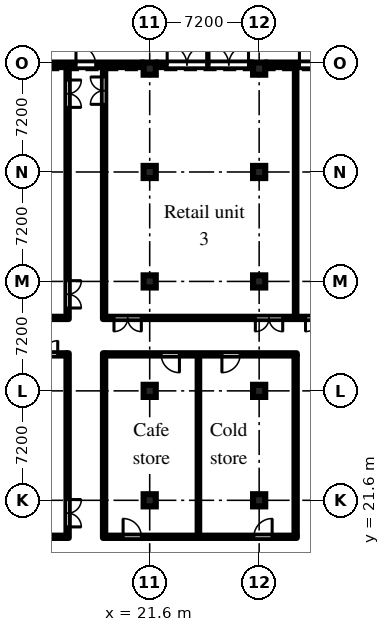
"""IFC4 building model, lengths in metres.
Left out: names, types, materials, properties, quantities, classifications, styles, units other than length and angle.
Written with IfcOpenShell. Run it as: python <this file> out.ifc"""

import sys

from ifc_helpers import new_model, si_unit, direction, frame, frame_2d, origin, origin_2d, place, context, subcontext, project, spatial, rectangle, extrude, element, fill, save


model = new_model("IFC4")
c1 = context("Model", 3, precision=1e-05, world=origin(), true_north=direction((0.0, 1.0)))
c2 = subcontext(c1, "Body", "Model", "MODEL_VIEW")
j1 = project(units=[si_unit("LENGTHUNIT", "METRE"), si_unit("PLANEANGLEUNIT", "RADIAN")], contexts=[c1])
p1 = place(None, origin())
s1 = spatial("IfcSite", under=j1, at=p1, CompositionType="ELEMENT")
p2 = place(p1, origin())
s2 = spatial("IfcBuilding", under=s1, at=p2, CompositionType="ELEMENT")
p3 = place(p2, origin())
s3 = spatial("IfcBuildingStorey", under=s2, at=p3, CompositionType="ELEMENT", Elevation=0.0)
for number, where, z_axis, x_axis in (
    (1, (21.6, 21.6, 0.0), (0.0, 0.0, 1.0), (1.0, 0.0, 0.0)),
    (2, (21.6, 28.8, 0.0), (0.0, 0.0, 1.0), (1.0, 0.0, 0.0)),
    (3, (21.6, 36.0, 0.0), (0.0, 0.0, 1.0), (1.0, 0.0, 0.0)),
    (4, (21.6, 43.2, 0.0), (0.0, 0.0, 1.0), (1.0, 0.0, 0.0)),
    (5, (21.6, 50.0, 0.0), (0.0, 0.0, 1.0), (1.0, 0.0, 0.0)),
    (6, (28.8, 21.6, 0.0), (0.0, 0.0, 1.0), (1.0, 0.0, 0.0)),
    (7, (28.8, 28.8, 0.0), (0.0, 0.0, 1.0), (1.0, 0.0, 0.0)),
    (8, (28.8, 36.0, 0.0), (0.0, 0.0, 1.0), (1.0, 0.0, 0.0)),
    (9, (28.8, 43.2, 0.0), (0.0, 0.0, 1.0), (1.0, 0.0, 0.0)),
    (10, (28.8, 50.0, 0.0), (0.0, 0.0, 1.0), (1.0, 0.0, 0.0)),
):
    element("IfcColumn", number, at=place(p3, frame(where, z_axis=z_axis, x_axis=x_axis)), inside=s3, PredefinedType="COLUMN", context=c2, shape_type="SweptSolid", body=[
        extrude(rectangle(XDim=0.8, YDim=0.8, at=origin_2d()), origin(), (0.0, 0.0, 1.0), 6.6),
    ])
p4 = place(p3, frame((35.6, 50.25, 0.0), z_axis=(0.0, 0.0, 1.0), x_axis=(-1.0, 0.0, 0.0)))
e11 = element("IfcWall", 11, at=p4, inside=s3, PredefinedType="SOLIDWALL", context=c2, shape_type="SweptSolid", body=[
    extrude(rectangle(XDim=6.4, YDim=0.3, at=frame_2d((3.2, 0.0))), origin(), (0.0, 0.0, 1.0), 6.6),
])
p5 = place(p4, frame((1.55, 0.0, 0.0)))
e12 = element("IfcOpeningElement", 12, at=p5, cuts=e11, PredefinedType="OPENING", context=c2, shape_type="SweptSolid", body=[
    extrude(rectangle(XDim=2.6, YDim=2.4, at=frame_2d((1.3, 1.2))), frame((0.0, 0.16, 0.0), z_axis=(0.0, -1.0, 0.0), x_axis=(1.0, 0.0, 0.0)), (0.0, 0.0, 1.0), 0.32),
])
p6 = place(p3, frame((28.4, 50.25, 0.0), z_axis=(0.0, 0.0, 1.0), x_axis=(-1.0, 0.0, 0.0)))
e13 = element("IfcWall", 13, at=p6, inside=s3, PredefinedType="SOLIDWALL", context=c2, shape_type="SweptSolid", body=[
    extrude(rectangle(XDim=6.4, YDim=0.3, at=frame_2d((3.2, 0.0))), origin(), (0.0, 0.0, 1.0), 6.6),
])
p7 = place(p6, frame((0.3, 0.0, 0.0)))
e14 = element("IfcOpeningElement", 14, at=p7, cuts=e13, PredefinedType="OPENING", context=c2, shape_type="SweptSolid", body=[
    extrude(rectangle(XDim=2.6, YDim=2.4, at=frame_2d((1.3, 1.2))), frame((0.0, 0.16, 0.0), z_axis=(0.0, -1.0, 0.0), x_axis=(1.0, 0.0, 0.0)), (0.0, 0.0, 1.0), 0.32),
])
p8 = place(p6, frame((3.05, 0.0, 0.0)))
e15 = element("IfcOpeningElement", 15, at=p8, cuts=e13, PredefinedType="OPENING", context=c2, shape_type="SweptSolid", body=[
    extrude(rectangle(XDim=2.6, YDim=2.4, at=frame_2d((1.3, 1.2))), frame((0.0, 0.16, 0.0), z_axis=(0.0, -1.0, 0.0), x_axis=(1.0, 0.0, 0.0)), (0.0, 0.0, 1.0), 0.32),
])
p9 = place(p3, frame((21.2, 50.25, 0.0), z_axis=(0.0, 0.0, 1.0), x_axis=(-1.0, 0.0, 0.0)))
e16 = element("IfcWall", 16, at=p9, inside=s3, PredefinedType="SOLIDWALL", context=c2, shape_type="SweptSolid", body=[
    extrude(rectangle(XDim=6.4, YDim=0.3, at=frame_2d((3.2, 0.0))), origin(), (0.0, 0.0, 1.0), 6.6),
])
p10 = place(p9, frame((3.15, 0.0, 0.0)))
e17 = element("IfcOpeningElement", 17, at=p10, cuts=e16, PredefinedType="OPENING", context=c2, shape_type="SweptSolid", body=[
    extrude(rectangle(XDim=1.3, YDim=2.1, at=frame_2d((0.65, 1.05))), frame((0.0, 0.16, 0.0), z_axis=(0.0, -1.0, 0.0), x_axis=(1.0, 0.0, 0.0)), (0.0, 0.0, 1.0), 0.32),
])
p11 = place(p3, frame((1.275, 19.2, 0.0), z_axis=(0.0, 0.0, 1.0), x_axis=(1.0, 0.0, 0.0)))
e18 = element("IfcWall", 18, at=p11, inside=s3, PredefinedType="PARTITIONING", context=c2, shape_type="SweptSolid", body=[
    extrude(rectangle(XDim=14.85, YDim=0.15, at=frame_2d((7.425, 0.0))), origin(), (0.0, 0.0, 1.0), 6.6),
])
p12 = place(p11, frame((1.175, 0.0, 0.0)))
e19 = element("IfcOpeningElement", 19, at=p12, cuts=e18, PredefinedType="OPENING", context=c2, shape_type="SweptSolid", body=[
    extrude(rectangle(XDim=1.2, YDim=2.1, at=frame_2d((0.6, 1.05))), frame((0.0, 0.085, 0.0), z_axis=(0.0, -1.0, 0.0), x_axis=(1.0, 0.0, 0.0)), (0.0, 0.0, 1.0), 0.17),
])
p13 = place(p11, frame((6.8, 0.0, 0.0)))
e20 = element("IfcOpeningElement", 20, at=p13, cuts=e18, PredefinedType="OPENING", context=c2, shape_type="SweptSolid", body=[
    extrude(rectangle(XDim=1.8, YDim=2.1, at=frame_2d((0.9, 1.05))), frame((0.0, 0.085, 0.0), z_axis=(0.0, -1.0, 0.0), x_axis=(1.0, 0.0, 0.0)), (0.0, 0.0, 1.0), 0.17),
])
p14 = place(p3, frame((9.521, 31.2, 0.0), z_axis=(0.0, 0.0, 1.0), x_axis=(1.0, 0.0, 0.0)))
e21 = element("IfcWall", 21, at=p14, inside=s3, PredefinedType="PARTITIONING", context=c2, shape_type="SweptSolid", body=[
    extrude(rectangle(XDim=6.604, YDim=0.15, at=frame_2d((3.302, 0.0))), origin(), (0.0, 0.0, 1.0), 6.6),
])
p15 = place(p14, frame((0.178, 0.0, 0.0)))
e22 = element("IfcOpeningElement", 22, at=p15, cuts=e21, PredefinedType="OPENING", context=c2, shape_type="SweptSolid", body=[
    extrude(rectangle(XDim=1.8, YDim=2.1, at=frame_2d((0.9, 1.05))), frame((0.0, 0.085, 0.0), z_axis=(0.0, -1.0, 0.0), x_axis=(1.0, 0.0, 0.0)), (0.0, 0.0, 1.0), 0.17),
])
p16 = place(p14, frame((4.229, 0.0, 0.0)))
e23 = element("IfcOpeningElement", 23, at=p16, cuts=e21, PredefinedType="OPENING", context=c2, shape_type="SweptSolid", body=[
    extrude(rectangle(XDim=1.8, YDim=2.1, at=frame_2d((0.9, 1.05))), frame((0.0, 0.085, 0.0), z_axis=(0.0, -1.0, 0.0), x_axis=(1.0, 0.0, 0.0)), (0.0, 0.0, 1.0), 0.17),
])
p17 = place(p3, frame((1.5, 33.6, 0.0), z_axis=(0.0, 0.0, 1.0), x_axis=(1.0, 0.0, 0.0)))
e24 = element("IfcWall", 24, at=p17, inside=s3, PredefinedType="PARTITIONING", context=c2, shape_type="SweptSolid", body=[
    extrude(rectangle(XDim=14.625, YDim=0.15, at=frame_2d((7.312, 0.0))), origin(), (0.0, 0.0, 1.0), 6.6),
])
p18 = place(p17, frame((0.65, 0.0, 0.0)))
e25 = element("IfcOpeningElement", 25, at=p18, cuts=e24, PredefinedType="OPENING", context=c2, shape_type="SweptSolid", body=[
    extrude(rectangle(XDim=1.8, YDim=2.1, at=frame_2d((0.9, 1.05))), frame((0.0, 0.085, 0.0), z_axis=(0.0, -1.0, 0.0), x_axis=(1.0, 0.0, 0.0)), (0.0, 0.0, 1.0), 0.17),
])
p19 = place(p3, frame((16.2, 19.125, 0.0), z_axis=(0.0, 0.0, 1.0), x_axis=(0.0, 1.0, 0.0)))
e26 = element("IfcWall", 26, at=p19, inside=s3, PredefinedType="PARTITIONING", context=c2, shape_type="SweptSolid", body=[
    extrude(rectangle(XDim=12.15, YDim=0.15, at=frame_2d((6.075, 0.0))), origin(), (0.0, 0.0, 1.0), 6.6),
])
p20 = place(p19, frame((0.725, 0.0, 0.0)))
e27 = element("IfcOpeningElement", 27, at=p20, cuts=e26, PredefinedType="OPENING", context=c2, shape_type="SweptSolid", body=[
    extrude(rectangle(XDim=1.8, YDim=2.1, at=frame_2d((0.9, 1.05))), frame((0.0, 0.085, 0.0), z_axis=(0.0, -1.0, 0.0), x_axis=(1.0, 0.0, 0.0)), (0.0, 0.0, 1.0), 0.17),
])
p21 = place(p3, frame((16.2, 33.525, 0.0), z_axis=(0.0, 0.0, 1.0), x_axis=(0.0, 1.0, 0.0)))
e28 = element("IfcWall", 28, at=p21, inside=s3, PredefinedType="PARTITIONING", context=c2, shape_type="SweptSolid", body=[
    extrude(rectangle(XDim=16.695, YDim=0.15, at=frame_2d((8.348, 0.0))), origin(), (0.0, 0.0, 1.0), 6.6),
])
p22 = place(p21, frame((0.725, 0.0, 0.0)))
e29 = element("IfcOpeningElement", 29, at=p22, cuts=e28, PredefinedType="OPENING", context=c2, shape_type="SweptSolid", body=[
    extrude(rectangle(XDim=1.8, YDim=2.1, at=frame_2d((0.9, 1.05))), frame((0.0, 0.085, 0.0), z_axis=(0.0, -1.0, 0.0), x_axis=(1.0, 0.0, 0.0)), (0.0, 0.0, 1.0), 0.17),
])
p23 = place(p21, frame((13.925, 0.0, 0.0)))
e30 = element("IfcOpeningElement", 30, at=p23, cuts=e28, PredefinedType="OPENING", context=c2, shape_type="SweptSolid", body=[
    extrude(rectangle(XDim=1.8, YDim=2.1, at=frame_2d((0.9, 1.05))), frame((0.0, 0.085, 0.0), z_axis=(0.0, -1.0, 0.0), x_axis=(1.0, 0.0, 0.0)), (0.0, 0.0, 1.0), 0.17),
])
p24 = place(p3, frame((18.6, 19.125, 0.0), z_axis=(0.0, 0.0, 1.0), x_axis=(0.0, 1.0, 0.0)))
e31 = element("IfcWall", 31, at=p24, inside=s3, PredefinedType="PARTITIONING", context=c2, shape_type="SweptSolid", body=[
    extrude(rectangle(XDim=12.15, YDim=0.15, at=frame_2d((6.075, 0.0))), origin(), (0.0, 0.0, 1.0), 6.6),
])
p25 = place(p3, frame((18.675, 19.2, 0.0), z_axis=(0.0, 0.0, 1.0), x_axis=(1.0, 0.0, 0.0)))
e32 = element("IfcWall", 32, at=p25, inside=s3, PredefinedType="PARTITIONING", context=c2, shape_type="SweptSolid", body=[
    extrude(rectangle(XDim=12.6, YDim=0.15, at=frame_2d((6.3, 0.0))), origin(), (0.0, 0.0, 1.0), 6.6),
])
p26 = place(p25, frame((1.175, 0.0, 0.0)))
e33 = element("IfcOpeningElement", 33, at=p26, cuts=e32, PredefinedType="OPENING", context=c2, shape_type="SweptSolid", body=[
    extrude(rectangle(XDim=1.2, YDim=2.1, at=frame_2d((0.6, 1.05))), frame((0.0, 0.085, 0.0), z_axis=(0.0, -1.0, 0.0), x_axis=(1.0, 0.0, 0.0)), (0.0, 0.0, 1.0), 0.17),
])
p27 = place(p25, frame((9.78, 0.0, 0.0)))
e34 = element("IfcOpeningElement", 34, at=p27, cuts=e32, PredefinedType="OPENING", context=c2, shape_type="SweptSolid", body=[
    extrude(rectangle(XDim=1.2, YDim=2.1, at=frame_2d((0.6, 1.05))), frame((0.0, 0.085, 0.0), z_axis=(0.0, -1.0, 0.0), x_axis=(1.0, 0.0, 0.0)), (0.0, 0.0, 1.0), 0.17),
])
p28 = place(p3, frame((18.675, 31.2, 0.0), z_axis=(0.0, 0.0, 1.0), x_axis=(1.0, 0.0, 0.0)))
e35 = element("IfcWall", 35, at=p28, inside=s3, PredefinedType="PARTITIONING", context=c2, shape_type="SweptSolid", body=[
    extrude(rectangle(XDim=12.6, YDim=0.15, at=frame_2d((6.3, 0.0))), origin(), (0.0, 0.0, 1.0), 6.6),
])
p29 = place(p28, frame((3.68, 0.0, 0.0)))
e36 = element("IfcOpeningElement", 36, at=p29, cuts=e35, PredefinedType="OPENING", context=c2, shape_type="SweptSolid", body=[
    extrude(rectangle(XDim=1.2, YDim=2.1, at=frame_2d((0.6, 1.05))), frame((0.0, 0.085, 0.0), z_axis=(0.0, -1.0, 0.0), x_axis=(1.0, 0.0, 0.0)), (0.0, 0.0, 1.0), 0.17),
])
p30 = place(p28, frame((7.675, 0.0, 0.0)))
e37 = element("IfcOpeningElement", 37, at=p30, cuts=e35, PredefinedType="OPENING", context=c2, shape_type="SweptSolid", body=[
    extrude(rectangle(XDim=1.2, YDim=2.1, at=frame_2d((0.6, 1.05))), frame((0.0, 0.085, 0.0), z_axis=(0.0, -1.0, 0.0), x_axis=(1.0, 0.0, 0.0)), (0.0, 0.0, 1.0), 0.17),
])
p31 = place(p3, frame((18.6, 33.525, 0.0), z_axis=(0.0, 0.0, 1.0), x_axis=(0.0, 1.0, 0.0)))
e38 = element("IfcWall", 38, at=p31, inside=s3, PredefinedType="PARTITIONING", context=c2, shape_type="SweptSolid", body=[
    extrude(rectangle(XDim=16.695, YDim=0.15, at=frame_2d((8.348, 0.0))), origin(), (0.0, 0.0, 1.0), 6.6),
])
p32 = place(p31, frame((14.125, 0.0, 0.0)))
e39 = element("IfcOpeningElement", 39, at=p32, cuts=e38, PredefinedType="OPENING", context=c2, shape_type="SweptSolid", body=[
    extrude(rectangle(XDim=1.8, YDim=2.1, at=frame_2d((0.9, 1.05))), frame((0.0, 0.085, 0.0), z_axis=(0.0, -1.0, 0.0), x_axis=(1.0, 0.0, 0.0)), (0.0, 0.0, 1.0), 0.17),
])
p33 = place(p3, frame((18.675, 33.6, 0.0), z_axis=(0.0, 0.0, 1.0), x_axis=(1.0, 0.0, 0.0)))
e40 = element("IfcWall", 40, at=p33, inside=s3, PredefinedType="PARTITIONING", context=c2, shape_type="SweptSolid", body=[
    extrude(rectangle(XDim=31.545, YDim=0.15, at=frame_2d((15.772, 0.0))), origin(), (0.0, 0.0, 1.0), 6.6),
])
p34 = place(p33, frame((28.475, 0.0, 0.0)))
e41 = element("IfcOpeningElement", 41, at=p34, cuts=e40, PredefinedType="OPENING", context=c2, shape_type="SweptSolid", body=[
    extrude(rectangle(XDim=2.4, YDim=2.1, at=frame_2d((1.2, 1.05))), frame((0.0, 0.085, 0.0), z_axis=(0.0, -1.0, 0.0), x_axis=(1.0, 0.0, 0.0)), (0.0, 0.0, 1.0), 0.17),
])
p35 = place(p33, frame((0.575, 0.0, 0.0)))
e42 = element("IfcOpeningElement", 42, at=p35, cuts=e40, PredefinedType="OPENING", context=c2, shape_type="SweptSolid", body=[
    extrude(rectangle(XDim=1.8, YDim=2.1, at=frame_2d((0.9, 1.05))), frame((0.0, 0.085, 0.0), z_axis=(0.0, -1.0, 0.0), x_axis=(1.0, 0.0, 0.0)), (0.0, 0.0, 1.0), 0.17),
])
p36 = place(p33, frame((9.875, 0.0, 0.0)))
e43 = element("IfcOpeningElement", 43, at=p36, cuts=e40, PredefinedType="OPENING", context=c2, shape_type="SweptSolid", body=[
    extrude(rectangle(XDim=1.8, YDim=2.1, at=frame_2d((0.9, 1.05))), frame((0.0, 0.085, 0.0), z_axis=(0.0, -1.0, 0.0), x_axis=(1.0, 0.0, 0.0)), (0.0, 0.0, 1.0), 0.17),
])
p37 = place(p33, frame((13.175, 0.0, 0.0)))
e44 = element("IfcOpeningElement", 44, at=p37, cuts=e40, PredefinedType="OPENING", context=c2, shape_type="SweptSolid", body=[
    extrude(rectangle(XDim=1.8, YDim=2.1, at=frame_2d((0.9, 1.05))), frame((0.0, 0.085, 0.0), z_axis=(0.0, -1.0, 0.0), x_axis=(1.0, 0.0, 0.0)), (0.0, 0.0, 1.0), 0.17),
])
p38 = place(p33, frame((25.475, 0.0, 0.0)))
e45 = element("IfcOpeningElement", 45, at=p38, cuts=e40, PredefinedType="OPENING", context=c2, shape_type="SweptSolid", body=[
    extrude(rectangle(XDim=1.8, YDim=2.1, at=frame_2d((0.9, 1.05))), frame((0.0, 0.085, 0.0), z_axis=(0.0, -1.0, 0.0), x_axis=(1.0, 0.0, 0.0)), (0.0, 0.0, 1.0), 0.17),
])
p39 = place(p3, frame((24.805, 19.275, 0.0), z_axis=(0.0, 0.0, 1.0), x_axis=(0.0, 1.0, 0.0)))
e46 = element("IfcWall", 46, at=p39, inside=s3, PredefinedType="PARTITIONING", context=c2, shape_type="SweptSolid", body=[
    extrude(rectangle(XDim=11.85, YDim=0.1, at=frame_2d((5.925, 0.0))), origin(), (0.0, 0.0, 1.0), 6.6),
])
p40 = place(p3, frame((31.2, 19.275, 0.0), z_axis=(0.0, 0.0, 1.0), x_axis=(0.0, 1.0, 0.0)))
e47 = element("IfcWall", 47, at=p40, inside=s3, PredefinedType="PARTITIONING", context=c2, shape_type="SweptSolid", body=[
    extrude(rectangle(XDim=11.85, YDim=0.15, at=frame_2d((5.925, 0.0))), origin(), (0.0, 0.0, 1.0), 6.6),
])
p41 = place(p3, frame((31.2, 33.675, 0.0), z_axis=(0.0, 0.0, 1.0), x_axis=(0.0, 1.0, 0.0)))
e48 = element("IfcWall", 48, at=p41, inside=s3, PredefinedType="PARTITIONING", context=c2, shape_type="SweptSolid", body=[
    extrude(rectangle(XDim=16.545, YDim=0.1, at=frame_2d((8.272, 0.0))), origin(), (0.0, 0.0, 1.0), 6.6),
])
p42 = place(p5, frame((2.6, 0.0, 0.0), z_axis=(0.0, 0.0, 1.0), x_axis=(-1.0, 0.0, 0.0)))
e49 = element("IfcDoor", 49, at=p42, inside=s3, OperationType="DOUBLE_DOOR_DOUBLE_SWING", PredefinedType="DOOR", context=c2, shape_type="SweptSolid", body=[
    extrude(rectangle(XDim=2.6, YDim=2.4, at=frame_2d((1.3, 1.2))), frame((0.0, 0.025, 0.0), z_axis=(0.0, -1.0, 0.0), x_axis=(1.0, 0.0, 0.0)), (0.0, 0.0, 1.0), 0.05),
])
fill(e12, e49)
p43 = place(p7, frame((2.6, 0.0, 0.0), z_axis=(0.0, 0.0, 1.0), x_axis=(-1.0, 0.0, 0.0)))
e50 = element("IfcDoor", 50, at=p43, inside=s3, OperationType="DOUBLE_DOOR_DOUBLE_SWING", PredefinedType="DOOR", context=c2, shape_type="SweptSolid", body=[
    extrude(rectangle(XDim=2.6, YDim=2.4, at=frame_2d((1.3, 1.2))), frame((0.0, 0.025, 0.0), z_axis=(0.0, -1.0, 0.0), x_axis=(1.0, 0.0, 0.0)), (0.0, 0.0, 1.0), 0.05),
])
fill(e14, e50)
p44 = place(p8, frame((2.6, 0.0, 0.0), z_axis=(0.0, 0.0, 1.0), x_axis=(-1.0, 0.0, 0.0)))
e51 = element("IfcDoor", 51, at=p44, inside=s3, OperationType="DOUBLE_DOOR_DOUBLE_SWING", PredefinedType="DOOR", context=c2, shape_type="SweptSolid", body=[
    extrude(rectangle(XDim=2.6, YDim=2.4, at=frame_2d((1.3, 1.2))), frame((0.0, 0.025, 0.0), z_axis=(0.0, -1.0, 0.0), x_axis=(1.0, 0.0, 0.0)), (0.0, 0.0, 1.0), 0.05),
])
fill(e15, e51)
p45 = place(p10, frame((1.3, 0.0, 0.0), z_axis=(0.0, 0.0, 1.0), x_axis=(-1.0, 0.0, 0.0)))
e52 = element("IfcDoor", 52, at=p45, inside=s3, OperationType="SINGLE_SWING_LEFT", PredefinedType="DOOR", context=c2, shape_type="SweptSolid", body=[
    extrude(rectangle(XDim=1.3, YDim=2.1, at=frame_2d((0.65, 1.05))), frame((0.0, 0.025, 0.0), z_axis=(0.0, -1.0, 0.0), x_axis=(1.0, 0.0, 0.0)), (0.0, 0.0, 1.0), 0.05),
])
fill(e17, e52)
p46 = place(p16, origin())
e53 = element("IfcDoor", 53, at=p46, inside=s3, OperationType="DOUBLE_DOOR_DOUBLE_SWING", PredefinedType="DOOR", context=c2, shape_type="SweptSolid", body=[
    extrude(rectangle(XDim=1.8, YDim=2.1, at=frame_2d((0.9, 1.05))), frame((0.0, 0.025, 0.0), z_axis=(0.0, -1.0, 0.0), x_axis=(1.0, 0.0, 0.0)), (0.0, 0.0, 1.0), 0.05),
])
fill(e23, e53)
p47 = place(p20, frame((1.8, 0.0, 0.0), z_axis=(0.0, 0.0, 1.0), x_axis=(-1.0, 0.0, 0.0)))
e54 = element("IfcDoor", 54, at=p47, inside=s3, OperationType="DOUBLE_DOOR_DOUBLE_SWING", PredefinedType="DOOR", context=c2, shape_type="SweptSolid", body=[
    extrude(rectangle(XDim=1.8, YDim=2.1, at=frame_2d((0.9, 1.05))), frame((0.0, 0.025, 0.0), z_axis=(0.0, -1.0, 0.0), x_axis=(1.0, 0.0, 0.0)), (0.0, 0.0, 1.0), 0.05),
])
fill(e27, e54)
p48 = place(p26, origin())
e55 = element("IfcDoor", 55, at=p48, inside=s3, OperationType="SINGLE_SWING_LEFT", PredefinedType="DOOR", context=c2, shape_type="SweptSolid", body=[
    extrude(rectangle(XDim=1.2, YDim=2.1, at=frame_2d((0.6, 1.05))), frame((0.0, 0.025, 0.0), z_axis=(0.0, -1.0, 0.0), x_axis=(1.0, 0.0, 0.0)), (0.0, 0.0, 1.0), 0.05),
])
fill(e33, e55)
p49 = place(p29, frame((1.2, 0.0, 0.0), z_axis=(0.0, 0.0, 1.0), x_axis=(-1.0, 0.0, 0.0)))
e56 = element("IfcDoor", 56, at=p49, inside=s3, OperationType="SINGLE_SWING_LEFT", PredefinedType="DOOR", context=c2, shape_type="SweptSolid", body=[
    extrude(rectangle(XDim=1.2, YDim=2.1, at=frame_2d((0.6, 1.05))), frame((0.0, 0.025, 0.0), z_axis=(0.0, -1.0, 0.0), x_axis=(1.0, 0.0, 0.0)), (0.0, 0.0, 1.0), 0.05),
])
fill(e36, e56)
p50 = place(p30, frame((1.2, 0.0, 0.0), z_axis=(0.0, 0.0, 1.0), x_axis=(-1.0, 0.0, 0.0)))
e57 = element("IfcDoor", 57, at=p50, inside=s3, OperationType="SINGLE_SWING_RIGHT", PredefinedType="DOOR", context=c2, shape_type="SweptSolid", body=[
    extrude(rectangle(XDim=1.2, YDim=2.1, at=frame_2d((0.6, 1.05))), frame((0.0, 0.025, 0.0), z_axis=(0.0, -1.0, 0.0), x_axis=(1.0, 0.0, 0.0)), (0.0, 0.0, 1.0), 0.05),
])
fill(e37, e57)
p51 = place(p27, origin())
e58 = element("IfcDoor", 58, at=p51, inside=s3, OperationType="SINGLE_SWING_RIGHT", PredefinedType="DOOR", context=c2, shape_type="SweptSolid", body=[
    extrude(rectangle(XDim=1.2, YDim=2.1, at=frame_2d((0.6, 1.05))), frame((0.0, 0.025, 0.0), z_axis=(0.0, -1.0, 0.0), x_axis=(1.0, 0.0, 0.0)), (0.0, 0.0, 1.0), 0.05),
])
fill(e34, e58)
p52 = place(p22, frame((1.8, 0.0, 0.0), z_axis=(0.0, 0.0, 1.0), x_axis=(-1.0, 0.0, 0.0)))
e59 = element("IfcDoor", 59, at=p52, inside=s3, OperationType="DOUBLE_DOOR_DOUBLE_SWING", PredefinedType="DOOR", context=c2, shape_type="SweptSolid", body=[
    extrude(rectangle(XDim=1.8, YDim=2.1, at=frame_2d((0.9, 1.05))), frame((0.0, 0.025, 0.0), z_axis=(0.0, -1.0, 0.0), x_axis=(1.0, 0.0, 0.0)), (0.0, 0.0, 1.0), 0.05),
])
fill(e29, e59)
p53 = place(p23, frame((1.8, 0.0, 0.0), z_axis=(0.0, 0.0, 1.0), x_axis=(-1.0, 0.0, 0.0)))
e60 = element("IfcDoor", 60, at=p53, inside=s3, OperationType="DOUBLE_DOOR_DOUBLE_SWING", PredefinedType="DOOR", context=c2, shape_type="SweptSolid", body=[
    extrude(rectangle(XDim=1.8, YDim=2.1, at=frame_2d((0.9, 1.05))), frame((0.0, 0.025, 0.0), z_axis=(0.0, -1.0, 0.0), x_axis=(1.0, 0.0, 0.0)), (0.0, 0.0, 1.0), 0.05),
])
fill(e30, e60)
p54 = place(p32, origin())
e61 = element("IfcDoor", 61, at=p54, inside=s3, OperationType="DOUBLE_DOOR_DOUBLE_SWING", PredefinedType="DOOR", context=c2, shape_type="SweptSolid", body=[
    extrude(rectangle(XDim=1.8, YDim=2.1, at=frame_2d((0.9, 1.05))), frame((0.0, 0.025, 0.0), z_axis=(0.0, -1.0, 0.0), x_axis=(1.0, 0.0, 0.0)), (0.0, 0.0, 1.0), 0.05),
])
fill(e39, e61)
p55 = place(p35, frame((1.8, 0.0, 0.0), z_axis=(0.0, 0.0, 1.0), x_axis=(-1.0, 0.0, 0.0)))
e62 = element("IfcDoor", 62, at=p55, inside=s3, OperationType="DOUBLE_DOOR_DOUBLE_SWING", PredefinedType="DOOR", context=c2, shape_type="SweptSolid", body=[
    extrude(rectangle(XDim=1.8, YDim=2.1, at=frame_2d((0.9, 1.05))), frame((0.0, 0.025, 0.0), z_axis=(0.0, -1.0, 0.0), x_axis=(1.0, 0.0, 0.0)), (0.0, 0.0, 1.0), 0.05),
])
fill(e42, e62)
p56 = place(p36, frame((1.8, 0.0, 0.0), z_axis=(0.0, 0.0, 1.0), x_axis=(-1.0, 0.0, 0.0)))
e63 = element("IfcDoor", 63, at=p56, inside=s3, OperationType="DOUBLE_DOOR_DOUBLE_SWING", PredefinedType="DOOR", context=c2, shape_type="SweptSolid", body=[
    extrude(rectangle(XDim=1.8, YDim=2.1, at=frame_2d((0.9, 1.05))), frame((0.0, 0.025, 0.0), z_axis=(0.0, -1.0, 0.0), x_axis=(1.0, 0.0, 0.0)), (0.0, 0.0, 1.0), 0.05),
])
fill(e43, e63)
p57 = place(p37, frame((1.8, 0.0, 0.0), z_axis=(0.0, 0.0, 1.0), x_axis=(-1.0, 0.0, 0.0)))
e64 = element("IfcDoor", 64, at=p57, inside=s3, OperationType="DOUBLE_DOOR_DOUBLE_SWING", PredefinedType="DOOR", context=c2, shape_type="SweptSolid", body=[
    extrude(rectangle(XDim=1.8, YDim=2.1, at=frame_2d((0.9, 1.05))), frame((0.0, 0.025, 0.0), z_axis=(0.0, -1.0, 0.0), x_axis=(1.0, 0.0, 0.0)), (0.0, 0.0, 1.0), 0.05),
])
fill(e44, e64)
save(model, sys.argv[1])
